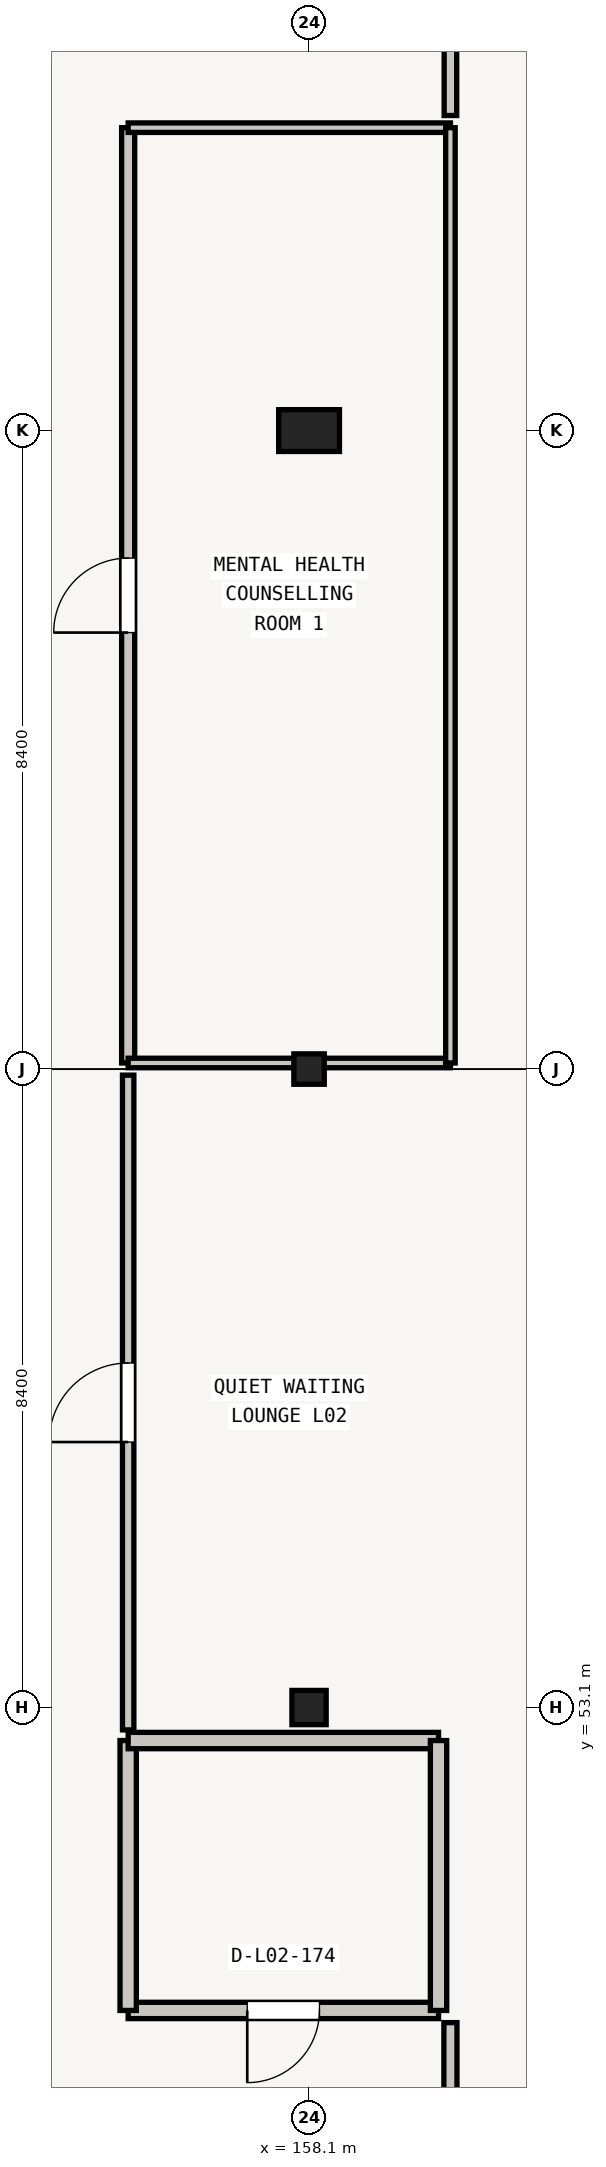
"""IFC4 building model, lengths in metres.
Left out: names, types, materials, properties, quantities, classifications, styles, units other than length and angle.
Written with IfcOpenShell. Run it as: python <this file> out.ifc"""

import sys

from ifc_helpers import new_model, si_unit, direction, frame, frame_2d, origin, origin_2d, place, context, subcontext, project, spatial, rectangle, extrude, element, fill, save


model = new_model("IFC4")
c1 = context("Model", 3, precision=1e-05, world=origin(), true_north=direction((0.0, 1.0)))
c2 = subcontext(c1, "Body", "Model", "MODEL_VIEW")
j1 = project(units=[si_unit("LENGTHUNIT", "METRE"), si_unit("PLANEANGLEUNIT", "RADIAN")], contexts=[c1])
p1 = place(None, origin())
s1 = spatial("IfcSite", under=j1, at=p1, CompositionType="ELEMENT")
p2 = place(p1, origin())
s2 = spatial("IfcBuilding", under=s1, at=p2, CompositionType="ELEMENT")
p3 = place(p2, frame((0.0, 0.0, 8.7)))
s3 = spatial("IfcBuildingStorey", under=s2, at=p3, CompositionType="ELEMENT", Elevation=8.7)
p4 = place(p3, frame((158.1, 53.1, 0.0), z_axis=(0.0, 0.0, 1.0), x_axis=(1.0, 0.0, 0.0)))
e1 = element("IfcColumn", 1, at=p4, inside=s3, PredefinedType="COLUMN", context=c2, shape_type="SweptSolid", body=[
    extrude(rectangle(XDim=0.45, YDim=0.45, at=origin_2d()), origin(), (0.0, 0.0, 1.0), 3.95),
])
p5 = place(p3, frame((158.1, 61.5, 0.0), z_axis=(0.0, 0.0, 1.0), x_axis=(1.0, 0.0, 0.0)))
e2 = element("IfcColumn", 2, at=p5, inside=s3, PredefinedType="COLUMN", context=c2, shape_type="SweptSolid", body=[
    extrude(rectangle(XDim=0.4, YDim=0.4, at=origin_2d()), origin(), (0.0, 0.0, 1.0), 3.95),
])
p6 = place(p3, frame((158.1, 69.9, 0.0), z_axis=(0.0, 0.0, 1.0), x_axis=(1.0, 0.0, 0.0)))
e3 = element("IfcColumn", 3, at=p6, inside=s3, PredefinedType="COLUMN", context=c2, shape_type="SweptSolid", body=[
    extrude(rectangle(XDim=0.8, YDim=0.55, at=origin_2d()), origin(), (0.0, 0.0, 1.0), 3.95),
])
p7 = place(p3, frame((159.803, 49.115, 0.0), z_axis=(0.0, 0.0, 1.0), x_axis=(-1.0, 0.0, 0.0)))
e4 = element("IfcWall", 4, at=p7, inside=s3, PredefinedType="PLUMBINGWALL", context=c2, shape_type="SweptSolid", body=[
    extrude(rectangle(XDim=4.083, YDim=0.215, at=frame_2d((2.042, 0.0))), origin(), (0.0, 0.0, 1.0), 2.97),
])
p8 = place(p7, frame((1.567, 0.0, 0.0)))
e5 = element("IfcOpeningElement", 5, at=p8, cuts=e4, PredefinedType="OPENING", context=c2, shape_type="SweptSolid", body=[
    extrude(rectangle(XDim=0.95, YDim=2.05, at=frame_2d((0.475, 1.025))), frame((0.0, 0.107, 0.0), z_axis=(0.0, -1.0, 0.0), x_axis=(1.0, 0.0, 0.0)), (0.0, 0.0, 1.0), 0.215),
])
p9 = place(p3, frame((155.72, 49.115, 0.0), z_axis=(0.0, 0.0, 1.0), x_axis=(0.0, 1.0, 0.0)))
e6 = element("IfcWall", 6, at=p9, inside=s3, PredefinedType="PLUMBINGWALL", context=c2, shape_type="SweptSolid", body=[
    extrude(rectangle(XDim=3.551, YDim=0.215, at=frame_2d((1.775, 0.0))), origin(), (0.0, 0.0, 1.0), 2.97),
])
p10 = place(p3, frame((155.72, 52.666, 0.0), z_axis=(0.0, 0.0, 1.0), x_axis=(1.0, 0.0, 0.0)))
e7 = element("IfcWall", 7, at=p10, inside=s3, PredefinedType="PLUMBINGWALL", context=c2, shape_type="SweptSolid", body=[
    extrude(rectangle(XDim=4.083, YDim=0.215, at=frame_2d((2.042, 0.0))), origin(), (0.0, 0.0, 1.0), 2.97),
])
p11 = place(p3, frame((159.803, 52.666, 0.0), z_axis=(0.0, 0.0, 1.0), x_axis=(0.0, -1.0, 0.0)))
e8 = element("IfcWall", 8, at=p11, inside=s3, PredefinedType="PLUMBINGWALL", context=c2, shape_type="SweptSolid", body=[
    extrude(rectangle(XDim=3.551, YDim=0.215, at=frame_2d((1.775, 0.0))), origin(), (0.0, 0.0, 1.0), 2.97),
])
p12 = place(p3, frame((155.72, 61.58, 0.0), z_axis=(0.0, 0.0, 1.0), x_axis=(0.0, 1.0, 0.0)))
e9 = element("IfcWall", 9, at=p12, inside=s3, PredefinedType="PARTITIONING", context=c2, shape_type="SweptSolid", body=[
    extrude(rectangle(XDim=12.305, YDim=0.172, at=frame_2d((6.152, 0.0))), origin(), (0.0, 0.0, 1.0), 2.97),
])
p13 = place(p12, frame((5.663, 0.0, 0.0)))
e10 = element("IfcOpeningElement", 10, at=p13, cuts=e9, PredefinedType="OPENING", context=c2, shape_type="SweptSolid", body=[
    extrude(rectangle(XDim=0.98, YDim=2.05, at=frame_2d((0.49, 1.025))), frame((0.0, 0.086, 0.0), z_axis=(0.0, -1.0, 0.0), x_axis=(1.0, 0.0, 0.0)), (0.0, 0.0, 1.0), 0.172),
])
for number, where, z_axis, x_axis in (
    (11, (159.96, 61.58, 0.0), (0.0, 0.0, 1.0), (-1.0, 0.0, 0.0)),
    (12, (155.72, 73.885, 0.0), (0.0, 0.0, 1.0), (1.0, 0.0, 0.0)),
):
    element("IfcWall", number, at=place(p3, frame(where, z_axis=z_axis, x_axis=x_axis)), inside=s3, PredefinedType="PARTITIONING", context=c2, shape_type="SweptSolid", body=[
        extrude(rectangle(XDim=4.24, YDim=0.125, at=frame_2d((2.12, 0.0))), origin(), (0.0, 0.0, 1.0), 2.97),
    ])
p14 = place(p3, frame((159.96, 73.885, 0.0), z_axis=(0.0, 0.0, 1.0), x_axis=(0.0, -1.0, 0.0)))
e13 = element("IfcWall", 13, at=p14, inside=s3, PredefinedType="PARTITIONING", context=c2, shape_type="SweptSolid", body=[
    extrude(rectangle(XDim=12.305, YDim=0.125, at=frame_2d((6.152, 0.0))), origin(), (0.0, 0.0, 1.0), 2.97),
])
p15 = place(p3, frame((159.96, 79.4, 0.0), z_axis=(0.0, 0.0, 1.0), x_axis=(0.0, -1.0, 0.0)))
e14 = element("IfcWall", 14, at=p15, inside=s3, PredefinedType="PARTITIONING", context=c2, shape_type="SweptSolid", body=[
    extrude(rectangle(XDim=5.355, YDim=0.165, at=frame_2d((2.677, 0.0))), origin(), (0.0, 0.0, 1.0), 2.97),
])
p16 = place(p15, frame((1.978, 0.0, 0.0)))
e15 = element("IfcOpeningElement", 15, at=p16, cuts=e14, PredefinedType="OPENING", context=c2, shape_type="SweptSolid", body=[
    extrude(rectangle(XDim=1.4, YDim=2.1, at=frame_2d((0.7, 1.05))), frame((0.0, 0.083, 0.0), z_axis=(0.0, -1.0, 0.0), x_axis=(1.0, 0.0, 0.0)), (0.0, 0.0, 1.0), 0.165),
])
p17 = place(p3, frame((155.72, 52.806, 0.0), z_axis=(0.0, 0.0, 1.0), x_axis=(0.0, 1.0, 0.0)))
e16 = element("IfcWall", 16, at=p17, inside=s3, PredefinedType="PARTITIONING", context=c2, shape_type="SweptSolid", body=[
    extrude(rectangle(XDim=8.614, YDim=0.15, at=frame_2d((4.307, 0.0))), origin(), (0.0, 0.0, 1.0), 2.97),
])
p18 = place(p17, frame((3.787, 0.0, 0.0)))
e17 = element("IfcOpeningElement", 17, at=p18, cuts=e16, PredefinedType="OPENING", context=c2, shape_type="SweptSolid", body=[
    extrude(rectangle(XDim=1.04, YDim=2.05, at=frame_2d((0.52, 1.025))), frame((0.0, 0.075, 0.0), z_axis=(0.0, -1.0, 0.0), x_axis=(1.0, 0.0, 0.0)), (0.0, 0.0, 1.0), 0.15),
])
p19 = place(p3, frame((159.96, 48.955, 0.0), z_axis=(0.0, 0.0, 1.0), x_axis=(0.0, -1.0, 0.0)))
e18 = element("IfcWall", 18, at=p19, inside=s3, PredefinedType="PARTITIONING", context=c2, shape_type="SweptSolid", body=[
    extrude(rectangle(XDim=3.905, YDim=0.172, at=frame_2d((1.953, 0.0))), origin(), (0.0, 0.0, 1.0), 2.97),
])
p20 = place(p19, frame((1.462, 0.0, 0.0)))
e19 = element("IfcOpeningElement", 19, at=p20, cuts=e18, PredefinedType="OPENING", context=c2, shape_type="SweptSolid", body=[
    extrude(rectangle(XDim=0.98, YDim=2.05, at=frame_2d((0.49, 1.025))), frame((0.0, 0.086, 0.0), z_axis=(0.0, -1.0, 0.0), x_axis=(1.0, 0.0, 0.0)), (0.0, 0.0, 1.0), 0.172),
])
p21 = place(p8, origin())
e20 = element("IfcDoor", 20, at=p21, inside=s3, OperationType="SINGLE_SWING_RIGHT", PredefinedType="DOOR", context=c2, shape_type="SweptSolid", body=[
    extrude(rectangle(XDim=0.95, YDim=2.05, at=frame_2d((0.475, 1.025))), frame((0.0, 0.025, 0.0), z_axis=(0.0, -1.0, 0.0), x_axis=(1.0, 0.0, 0.0)), (0.0, 0.0, 1.0), 0.05),
])
fill(e5, e20)
p22 = place(p13, origin())
e21 = element("IfcDoor", 21, at=p22, inside=s3, OperationType="SINGLE_SWING_LEFT", PredefinedType="DOOR", context=c2, shape_type="SweptSolid", body=[
    extrude(rectangle(XDim=0.98, YDim=2.05, at=frame_2d((0.49, 1.025))), frame((0.0, 0.025, 0.0), z_axis=(0.0, -1.0, 0.0), x_axis=(1.0, 0.0, 0.0)), (0.0, 0.0, 1.0), 0.05),
])
fill(e10, e21)
p23 = place(p18, origin())
e22 = element("IfcDoor", 22, at=p23, inside=s3, OperationType="SINGLE_SWING_LEFT", PredefinedType="DOOR", context=c2, shape_type="SweptSolid", body=[
    extrude(rectangle(XDim=1.04, YDim=2.05, at=frame_2d((0.52, 1.025))), frame((0.0, 0.025, 0.0), z_axis=(0.0, -1.0, 0.0), x_axis=(1.0, 0.0, 0.0)), (0.0, 0.0, 1.0), 0.05),
])
fill(e17, e22)
save(model, sys.argv[1])
